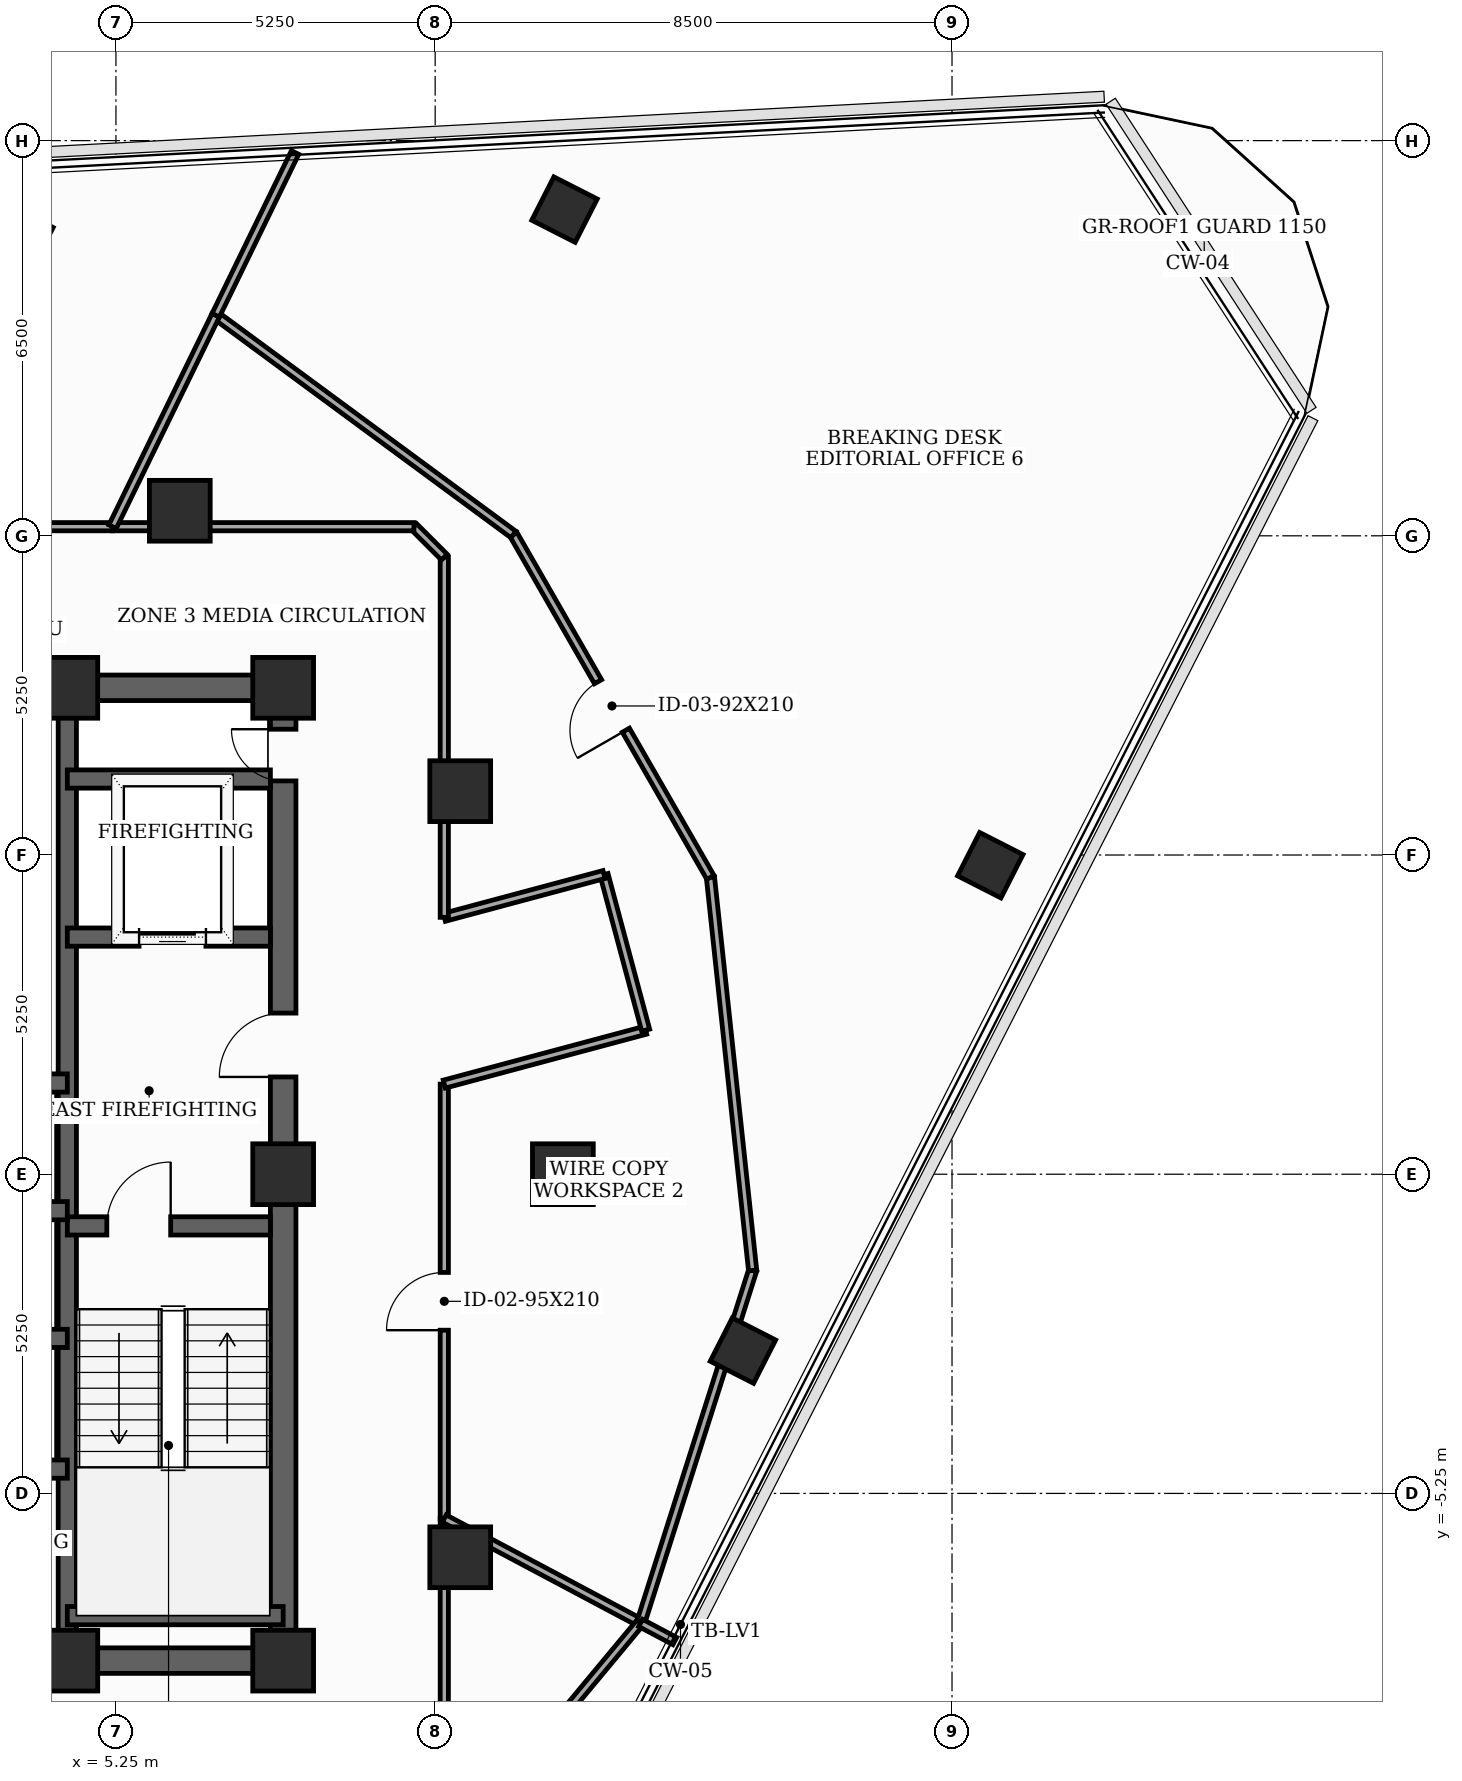
"""IFC4 building model, lengths in metres.
Left out: names, types, materials, properties, quantities, classifications, styles, units other than length and angle.
Written with IfcOpenShell. Run it as: python <this file> out.ifc"""

import sys

from ifc_helpers import new_model, si_unit, direction, frame, frame_2d, origin, origin_2d, place, context, subcontext, project, spatial, rectangle, extrude, element, fill, save


model = new_model("IFC4")
c1 = context("Model", 3, precision=1e-05, world=origin(), true_north=direction((0.0, 1.0)))
c2 = subcontext(c1, "Body", "Model", "MODEL_VIEW")
j1 = project(units=[si_unit("LENGTHUNIT", "METRE"), si_unit("PLANEANGLEUNIT", "RADIAN")], contexts=[c1])
p1 = place(None, origin())
s1 = spatial("IfcSite", under=j1, at=p1, CompositionType="ELEMENT")
p2 = place(p1, origin())
s2 = spatial("IfcBuilding", under=s1, at=p2, CompositionType="ELEMENT")
p3 = place(p2, frame((0.0, 0.0, 267.0)))
s3 = spatial("IfcBuildingStorey", under=s2, at=p3, CompositionType="ELEMENT", Elevation=267.0)
for number, where, z_axis, x_axis in (
    (1, (4.45, -8.0, 0.0), (0.0, 0.0, 1.0), (1.0, 0.0, 0.0)),
    (2, (8.0, -8.0, 0.0), (0.0, 0.0, 1.0), (1.0, 0.0, 0.0)),
    (3, (8.0, 0.0, 0.0), (0.0, 0.0, 1.0), (1.0, 0.0, 0.0)),
    (4, (8.0, 8.0, 0.0), (0.0, 0.0, 1.0), (1.0, 0.0, 0.0)),
    (5, (4.45, 8.0, 0.0), (0.0, 0.0, 1.0), (1.0, 0.0, 0.0)),
    (6, (12.6, 0.0, 0.0), (0.0, 0.0, 1.0), (1.0, 0.0, 0.0)),
    (7, (10.912, 6.3, 0.0), (0.0, 0.0, 1.0), (1.0, 0.0, 0.0)),
    (8, (6.3, 10.912, 0.0), (0.0, 0.0, 1.0), (1.0, 0.0, 0.0)),
    (9, (10.912, -6.3, 0.0), (0.0, 0.0, 1.0), (1.0, 0.0, 0.0)),
):
    element("IfcColumn", number, at=place(p3, frame(where, z_axis=z_axis, x_axis=x_axis)), inside=s3, PredefinedType="COLUMN", context=c2, shape_type="SweptSolid", body=[
        extrude(rectangle(XDim=1.0, YDim=1.0, at=origin_2d()), origin(), (0.0, 0.0, 1.0), 3.7),
    ])
for number, where, z_axis, x_axis in (
    (10, (15.562, -2.901, 0.0), (0.0, 0.0, 1.0), (0.454, 0.891, 0.0)),
    (11, (19.629, 5.082, 0.0), (0.0, 0.0, 1.0), (0.454, 0.891, 0.0)),
    (12, (12.627, 15.865, 0.0), (0.0, 0.0, 1.0), (0.454, 0.891, 0.0)),
    (13, (3.679, 15.396, 0.0), (0.0, 0.0, 1.0), (0.454, 0.891, 0.0)),
):
    element("IfcColumn", number, at=place(p3, frame(where, z_axis=z_axis, x_axis=x_axis)), inside=s3, PredefinedType="COLUMN", context=c2, shape_type="SweptSolid", body=[
        extrude(rectangle(XDim=0.8, YDim=0.8, at=origin_2d()), origin(), (0.0, 0.0, 1.0), 3.7),
    ])
p4 = place(p3, frame((8.0, -8.0, 0.0), z_axis=(0.0, 0.0, 1.0), x_axis=(0.0, 1.0, 0.0)))
e14 = element("IfcWall", 14, at=p4, inside=s3, PredefinedType="SHEAR", context=c2, shape_type="SweptSolid", body=[
    extrude(rectangle(XDim=16.0, YDim=0.42, at=frame_2d((8.0, 0.0))), origin(), (0.0, 0.0, 1.0), 3.5),
])
p5 = place(p4, frame((9.6, 0.0, 0.0)))
e15 = element("IfcOpeningElement", 15, at=p5, cuts=e14, PredefinedType="OPENING", context=c2, shape_type="SweptSolid", body=[
    extrude(rectangle(XDim=1.05, YDim=2.15, at=frame_2d((0.525, 1.075))), frame((0.0, 0.22, 0.0), z_axis=(0.0, -1.0, 0.0), x_axis=(1.0, 0.0, 0.0)), (0.0, 0.0, 1.0), 0.44),
])
p6 = place(p4, frame((14.469, 0.0, 0.0)))
e16 = element("IfcOpeningElement", 16, at=p6, cuts=e14, PredefinedType="OPENING", context=c2, shape_type="SweptSolid", body=[
    extrude(rectangle(XDim=0.85, YDim=2.02, at=frame_2d((0.425, 1.01))), frame((0.0, 0.22, 0.0), z_axis=(0.0, -1.0, 0.0), x_axis=(1.0, 0.0, 0.0)), (0.0, 0.0, 1.0), 0.44),
])
p7 = place(p3, frame((-8.0, -8.0, 0.0), z_axis=(0.0, 0.0, 1.0), x_axis=(1.0, 0.0, 0.0)))
e17 = element("IfcWall", 17, at=p7, inside=s3, PredefinedType="SHEAR", context=c2, shape_type="SweptSolid", body=[
    extrude(rectangle(XDim=16.0, YDim=0.42, at=frame_2d((8.0, 0.0))), origin(), (0.0, 0.0, 1.0), 3.5),
])
p8 = place(p7, frame((4.6, 0.0, 0.0)))
e18 = element("IfcOpeningElement", 18, at=p8, cuts=e17, PredefinedType="OPENING", context=c2, shape_type="SweptSolid", body=[
    extrude(rectangle(XDim=0.95, YDim=2.1, at=frame_2d((0.475, 1.05))), frame((0.0, 0.22, 0.0), z_axis=(0.0, -1.0, 0.0), x_axis=(1.0, 0.0, 0.0)), (0.0, 0.0, 1.0), 0.44),
])
p9 = place(p7, frame((7.52, 0.0, 0.0)))
e19 = element("IfcOpeningElement", 19, at=p9, cuts=e17, PredefinedType="OPENING", context=c2, shape_type="SweptSolid", body=[
    extrude(rectangle(XDim=0.95, YDim=2.1, at=frame_2d((0.475, 1.05))), frame((0.0, 0.22, 0.0), z_axis=(0.0, -1.0, 0.0), x_axis=(1.0, 0.0, 0.0)), (0.0, 0.0, 1.0), 0.44),
])
p10 = place(p7, frame((10.45, 0.0, 0.0)))
e20 = element("IfcOpeningElement", 20, at=p10, cuts=e17, PredefinedType="OPENING", context=c2, shape_type="SweptSolid", body=[
    extrude(rectangle(XDim=0.95, YDim=2.1, at=frame_2d((0.475, 1.05))), frame((0.0, 0.22, 0.0), z_axis=(0.0, -1.0, 0.0), x_axis=(1.0, 0.0, 0.0)), (0.0, 0.0, 1.0), 0.44),
])
p11 = place(p3, frame((-8.0, 8.0, 0.0), z_axis=(0.0, 0.0, 1.0), x_axis=(1.0, 0.0, 0.0)))
e21 = element("IfcWall", 21, at=p11, inside=s3, PredefinedType="SHEAR", context=c2, shape_type="SweptSolid", body=[
    extrude(rectangle(XDim=16.0, YDim=0.42, at=frame_2d((8.0, 0.0))), origin(), (0.0, 0.0, 1.0), 3.5),
])
p12 = place(p11, frame((7.1, 0.0, 0.0)))
e22 = element("IfcOpeningElement", 22, at=p12, cuts=e21, PredefinedType="OPENING", context=c2, shape_type="SweptSolid", body=[
    extrude(rectangle(XDim=1.8, YDim=2.15, at=frame_2d((0.9, 1.075))), frame((0.0, 0.22, 0.0), z_axis=(0.0, -1.0, 0.0), x_axis=(1.0, 0.0, 0.0)), (0.0, 0.0, 1.0), 0.44),
])
p13 = place(p3, frame((4.45, -7.79, 0.0), z_axis=(0.0, 0.0, 1.0), x_axis=(0.0, 1.0, 0.0)))
e23 = element("IfcWall", 23, at=p13, inside=s3, PredefinedType="SHEAR", context=c2, shape_type="SweptSolid", body=[
    extrude(rectangle(XDim=15.58, YDim=0.3, at=frame_2d((7.79, 0.0))), origin(), (0.0, 0.0, 1.0), 3.5),
])
p14 = place(p3, frame((4.45, -0.85, 0.0), z_axis=(0.0, 0.0, 1.0), x_axis=(1.0, 0.0, 0.0)))
e24 = element("IfcWall", 24, at=p14, inside=s3, PredefinedType="SHEAR", context=c2, shape_type="SweptSolid", body=[
    extrude(rectangle(XDim=3.34, YDim=0.3, at=frame_2d((1.67, 0.0))), origin(), (0.0, 0.0, 1.0), 3.5),
])
p15 = place(p14, frame((0.65, 0.0, 0.0)))
e25 = element("IfcOpeningElement", 25, at=p15, cuts=e24, PredefinedType="OPENING", context=c2, shape_type="SweptSolid", body=[
    extrude(rectangle(XDim=1.05, YDim=2.15, at=frame_2d((0.525, 1.075))), frame((0.0, 0.16, 0.0), z_axis=(0.0, -1.0, 0.0), x_axis=(1.0, 0.0, 0.0)), (0.0, 0.0, 1.0), 0.32),
])
p16 = place(p3, frame((4.45, -7.26, 0.0), z_axis=(0.0, 0.0, 1.0), x_axis=(1.0, 0.0, 0.0)))
e26 = element("IfcWall", 26, at=p16, inside=s3, PredefinedType="SHEAR", context=c2, shape_type="SweptSolid", body=[
    extrude(rectangle(XDim=3.55, YDim=0.3, at=frame_2d((1.775, 0.0))), origin(), (0.0, 0.0, 1.0), 3.5),
])
p17 = place(p3, frame((4.45, 3.9, 0.0), z_axis=(0.0, 0.0, 1.0), x_axis=(1.0, 0.0, 0.0)))
e27 = element("IfcWall", 27, at=p17, inside=s3, PredefinedType="SHEAR", context=c2, shape_type="SweptSolid", body=[
    extrude(rectangle(XDim=3.34, YDim=0.3, at=frame_2d((1.67, 0.0))), origin(), (0.0, 0.0, 1.0), 3.5),
])
p18 = place(p17, frame((1.18, 0.0, 0.0)))
e28 = element("IfcOpeningElement", 28, at=p18, cuts=e27, PredefinedType="OPENING", context=c2, shape_type="SweptSolid", body=[
    extrude(rectangle(XDim=1.1, YDim=2.1, at=frame_2d((0.55, 1.05))), frame((0.0, 0.16, 0.0), z_axis=(0.0, -1.0, 0.0), x_axis=(1.0, 0.0, 0.0)), (0.0, 0.0, 1.0), 0.32),
])
p19 = place(p3, frame((4.45, 6.5, 0.0), z_axis=(0.0, 0.0, 1.0), x_axis=(1.0, 0.0, 0.0)))
e29 = element("IfcWall", 29, at=p19, inside=s3, PredefinedType="SHEAR", context=c2, shape_type="SweptSolid", body=[
    extrude(rectangle(XDim=3.34, YDim=0.3, at=frame_2d((1.67, 0.0))), origin(), (0.0, 0.0, 1.0), 3.5),
])
p20 = place(p3, frame((-4.45, -4.85, 0.0), z_axis=(0.0, 0.0, 1.0), x_axis=(1.0, 0.0, 0.0)))
e30 = element("IfcWall", 30, at=p20, inside=s3, PredefinedType="SHEAR", context=c2, shape_type="SweptSolid", body=[
    extrude(rectangle(XDim=8.9, YDim=0.3, at=frame_2d((4.45, 0.0))), origin(), (0.0, 0.0, 1.0), 3.5),
])
for number, where, z_axis, x_axis in (
    (31, (1.68, 1.5, 0.0), (0.0, 0.0, 1.0), (1.0, 0.0, 0.0)),
    (32, (1.68, -2.7, 0.0), (0.0, 0.0, 1.0), (1.0, 0.0, 0.0)),
    (33, (1.68, -0.6, 0.0), (0.0, 0.0, 1.0), (1.0, 0.0, 0.0)),
):
    element("IfcWall", number, at=place(p3, frame(where, z_axis=z_axis, x_axis=x_axis)), inside=s3, PredefinedType="SHEAR", context=c2, shape_type="SweptSolid", body=[
        extrude(rectangle(XDim=2.77, YDim=0.3, at=frame_2d((1.385, 0.0))), origin(), (0.0, 0.0, 1.0), 3.5),
    ])
p21 = place(p3, frame((10.65, -5.663, 0.0), z_axis=(0.0, 0.0, 1.0), x_axis=(0.0, 1.0, 0.0)))
e34 = element("IfcWall", 34, at=p21, inside=s3, PredefinedType="PARTITIONING", context=c2, shape_type="SweptSolid", body=[
    extrude(rectangle(XDim=7.145, YDim=0.135, at=frame_2d((3.573, 0.0))), origin(), (0.0, 0.0, 1.0), 2.885),
])
p22 = place(p21, frame((3.097, 0.0, 0.0)))
e35 = element("IfcOpeningElement", 35, at=p22, cuts=e34, PredefinedType="OPENING", context=c2, shape_type="SweptSolid", body=[
    extrude(rectangle(XDim=0.95, YDim=2.1, at=frame_2d((0.475, 1.05))), frame((0.0, 0.077, 0.0), z_axis=(0.0, -1.0, 0.0), x_axis=(1.0, 0.0, 0.0)), (0.0, 0.0, 1.0), 0.155),
])
p23 = place(p3, frame((10.65, 1.482, 0.0), z_axis=(0.0, 0.0, 1.0), x_axis=(0.965961397105, 0.2586862565, 0.0)))
e36 = element("IfcWall", 36, at=p23, inside=s3, PredefinedType="PARTITIONING", context=c2, shape_type="SweptSolid", body=[
    extrude(rectangle(XDim=3.429, YDim=0.135, at=frame_2d((1.714, 0.0))), origin(), (0.0, 0.0, 1.0), 2.885),
])
p24 = place(p3, frame((13.962, 2.369, 0.0), z_axis=(0.0, 0.0, 1.0), x_axis=(-0.258413725385, 0.966034340245, 0.0)))
e37 = element("IfcWall", 37, at=p24, inside=s3, PredefinedType="PARTITIONING", context=c2, shape_type="SweptSolid", body=[
    extrude(rectangle(XDim=2.65, YDim=0.135, at=frame_2d((1.325, 0.0))), origin(), (0.0, 0.0, 1.0), 3.5),
])
p25 = place(p3, frame((13.277, 4.929, 0.0), z_axis=(0.0, 0.0, 1.0), x_axis=(-0.965934830229, -0.258785439601, 0.0)))
e38 = element("IfcWall", 38, at=p25, inside=s3, PredefinedType="PARTITIONING", context=c2, shape_type="SweptSolid", body=[
    extrude(rectangle(XDim=2.72, YDim=0.135, at=frame_2d((1.36, 0.0))), origin(), (0.0, 0.0, 1.0), 2.885),
])
p26 = place(p3, frame((10.65, 4.225, 0.0), z_axis=(0.0, 0.0, 1.0), x_axis=(0.0, 1.0, 0.0)))
e39 = element("IfcWall", 39, at=p26, inside=s3, PredefinedType="PARTITIONING", context=c2, shape_type="SweptSolid", body=[
    extrude(rectangle(XDim=5.925, YDim=0.135, at=frame_2d((2.962, 0.0))), origin(), (0.0, 0.0, 1.0), 2.885),
])
p27 = place(p3, frame((10.65, 10.15, 0.0), z_axis=(0.0, 0.0, 1.0), x_axis=(-0.707106781187, 0.707106781187, 0.0)))
e40 = element("IfcWall", 40, at=p27, inside=s3, PredefinedType="PARTITIONING", context=c2, shape_type="SweptSolid", body=[
    extrude(rectangle(XDim=0.707, YDim=0.135, at=frame_2d((0.354, 0.0))), origin(), (0.0, 0.0, 1.0), 3.5),
])
p28 = place(p3, frame((10.15, 10.65, 0.0), z_axis=(0.0, 0.0, 1.0), x_axis=(-1.0, 0.0, 0.0)))
e41 = element("IfcWall", 41, at=p28, inside=s3, PredefinedType="PARTITIONING", context=c2, shape_type="SweptSolid", body=[
    extrude(rectangle(XDim=4.956, YDim=0.135, at=frame_2d((2.478, 0.0))), origin(), (0.0, 0.0, 1.0), 2.085),
])
p29 = place(p3, frame((10.65, -10.15, 0.0), z_axis=(0.0, 0.0, 1.0), x_axis=(0.0, 1.0, 0.0)))
e42 = element("IfcWall", 42, at=p29, inside=s3, PredefinedType="PARTITIONING", context=c2, shape_type="SweptSolid", body=[
    extrude(rectangle(XDim=4.487, YDim=0.135, at=frame_2d((2.243, 0.0))), origin(), (0.0, 0.0, 1.0), 2.885),
])
p30 = place(p3, frame((5.194, 10.65, 0.0), z_axis=(0.0, 0.0, 1.0), x_axis=(-1.0, 0.0, 0.0)))
e43 = element("IfcWall", 43, at=p30, inside=s3, PredefinedType="PARTITIONING", context=c2, shape_type="SweptSolid", body=[
    extrude(rectangle(XDim=6.344, YDim=0.135, at=frame_2d((3.172, 0.0))), origin(), (0.0, 0.0, 1.0), 2.085),
])
p31 = place(p30, frame((2.697, 0.0, 0.0)))
e44 = element("IfcOpeningElement", 44, at=p31, cuts=e43, PredefinedType="OPENING", context=c2, shape_type="SweptSolid", body=[
    extrude(rectangle(XDim=0.95, YDim=2.035, at=frame_2d((0.475, 1.018))), frame((0.0, 0.077, 0.0), z_axis=(0.0, -1.0, 0.0), x_axis=(1.0, 0.0, 0.0)), (0.0, 0.0, 1.0), 0.155),
])
p32 = place(p3, frame((10.65, -5.663, 0.0), z_axis=(0.0, 0.0, 1.0), x_axis=(0.882982204984, -0.469406461057, 0.0)))
e45 = element("IfcWall", 45, at=p32, inside=s3, PredefinedType="PARTITIONING", context=c2, shape_type="SweptSolid", body=[
    extrude(rectangle(XDim=3.647, YDim=0.135, at=frame_2d((1.823, 0.0))), origin(), (0.0, 0.0, 1.0), 2.885),
])
p33 = place(p3, frame((13.887, -7.354, 0.0), z_axis=(0.0, 0.0, 1.0), x_axis=(0.302867480059, 0.953032680197, 0.0)))
e46 = element("IfcWall", 46, at=p33, inside=s3, PredefinedType="PARTITIONING", context=c2, shape_type="SweptSolid", body=[
    extrude(rectangle(XDim=6.055, YDim=0.135, at=frame_2d((3.028, 0.0))), origin(), (0.0, 0.0, 1.0), 3.035),
])
p34 = place(p3, frame((15.721, -1.583, 0.0), z_axis=(0.0, 0.0, 1.0), x_axis=(-0.106709447524, 0.994290246261, 0.0)))
e47 = element("IfcWall", 47, at=p34, inside=s3, PredefinedType="PARTITIONING", context=c2, shape_type="SweptSolid", body=[
    extrude(rectangle(XDim=6.502, YDim=0.135, at=frame_2d((3.251, 0.0))), origin(), (0.0, 0.0, 1.0), 3.035),
])
p35 = place(p3, frame((15.027, 4.882, 0.0), z_axis=(0.0, 0.0, 1.0), x_axis=(-0.498082419026, 0.867129692639, 0.0)))
e48 = element("IfcWall", 48, at=p35, inside=s3, PredefinedType="PARTITIONING", context=c2, shape_type="SweptSolid", body=[
    extrude(rectangle(XDim=6.503, YDim=0.135, at=frame_2d((3.251, 0.0))), origin(), (0.0, 0.0, 1.0), 3.185),
])
p36 = place(p35, frame((2.792, 0.0, 0.0)))
e49 = element("IfcOpeningElement", 49, at=p36, cuts=e48, PredefinedType="OPENING", context=c2, shape_type="SweptSolid", body=[
    extrude(rectangle(XDim=0.92, YDim=2.1, at=frame_2d((0.46, 1.05))), frame((0.0, 0.077, 0.0), z_axis=(0.0, -1.0, 0.0), x_axis=(1.0, 0.0, 0.0)), (0.0, 0.0, 1.0), 0.155),
])
p37 = place(p3, frame((11.788, 10.521, 0.0), z_axis=(0.0, 0.0, 1.0), x_axis=(-0.805162772786, 0.593053883993, 0.0)))
e50 = element("IfcWall", 50, at=p37, inside=s3, PredefinedType="PARTITIONING", context=c2, shape_type="SweptSolid", body=[
    extrude(rectangle(XDim=6.082, YDim=0.135, at=frame_2d((3.041, 0.0))), origin(), (0.0, 0.0, 1.0), 3.035),
])
p38 = place(p3, frame((6.891, 14.128, 0.0), z_axis=(0.0, 0.0, 1.0), x_axis=(-0.438511877771, -0.898725393573, 0.0)))
e51 = element("IfcWall", 51, at=p38, inside=s3, PredefinedType="PARTITIONING", context=c2, shape_type="SweptSolid", body=[
    extrude(rectangle(XDim=3.87, YDim=0.135, at=frame_2d((1.935, 0.0))), origin(), (0.0, 0.0, 1.0), 2.075),
])
p39 = place(p3, frame((13.87, -7.375, 0.0), z_axis=(0.0, 0.0, 1.0), x_axis=(-0.63949044568, -0.768799043888, 0.0)))
e52 = element("IfcWall", 52, at=p39, inside=s3, PredefinedType="PARTITIONING", context=c2, shape_type="SweptSolid", body=[
    extrude(rectangle(XDim=6.82, YDim=0.135, at=frame_2d((3.41, 0.0))), origin(), (0.0, 0.0, 1.0), 3.035),
])
p40 = place(p3, frame((14.441, -7.678, 0.0), z_axis=(0.0, 0.0, 1.0), x_axis=(-0.883423592085, 0.468575241501, 0.0)))
e53 = element("IfcWall", 53, at=p40, inside=s3, PredefinedType="PARTITIONING", context=c2, shape_type="SweptSolid", body=[
    extrude(rectangle(XDim=0.636, YDim=0.135, at=frame_2d((0.318, 0.0))), origin(), (0.0, 0.0, 1.0), 3.5),
])
p41 = place(p3, frame((8.196, 16.805, 0.0), z_axis=(0.0, 0.0, 1.0), x_axis=(-0.438139314435, -0.898907081486, 0.0)))
e54 = element("IfcWall", 54, at=p41, inside=s3, PredefinedType="PARTITIONING", context=c2, shape_type="SweptSolid", body=[
    extrude(rectangle(XDim=2.978, YDim=0.135, at=frame_2d((1.489, 0.0))), origin(), (0.0, 0.0, 1.0), 3.025),
])
p42 = place(p5, origin())
e55 = element("IfcDoor", 55, at=p42, inside=s3, OperationType="SINGLE_SWING_LEFT", PredefinedType="DOOR", context=c2, shape_type="SweptSolid", body=[
    extrude(rectangle(XDim=1.05, YDim=2.15, at=frame_2d((0.525, 1.075))), frame((0.0, 0.025, 0.0), z_axis=(0.0, -1.0, 0.0), x_axis=(1.0, 0.0, 0.0)), (0.0, 0.0, 1.0), 0.05),
])
fill(e15, e55)
p43 = place(p6, origin())
e56 = element("IfcDoor", 56, at=p43, inside=s3, OperationType="SINGLE_SWING_RIGHT", PredefinedType="TRAPDOOR", context=c2, shape_type="SweptSolid", body=[
    extrude(rectangle(XDim=0.85, YDim=2.02, at=frame_2d((0.425, 1.01))), frame((0.0, 0.025, 0.0), z_axis=(0.0, -1.0, 0.0), x_axis=(1.0, 0.0, 0.0)), (0.0, 0.0, 1.0), 0.05),
])
fill(e16, e56)
p44 = place(p15, origin())
e57 = element("IfcDoor", 57, at=p44, inside=s3, OperationType="SINGLE_SWING_RIGHT", PredefinedType="DOOR", context=c2, shape_type="SweptSolid", body=[
    extrude(rectangle(XDim=1.05, YDim=2.15, at=frame_2d((0.525, 1.075))), frame((0.0, 0.025, 0.0), z_axis=(0.0, -1.0, 0.0), x_axis=(1.0, 0.0, 0.0)), (0.0, 0.0, 1.0), 0.05),
])
fill(e25, e57)
p45 = place(p18, origin())
e58 = element("IfcDoor", 58, at=p45, inside=s3, OperationType="SLIDING_TO_LEFT", PredefinedType="DOOR", context=c2, shape_type="SweptSolid", body=[
    extrude(rectangle(XDim=1.1, YDim=2.1, at=frame_2d((0.55, 1.05))), frame((0.0, 0.025, 0.0), z_axis=(0.0, -1.0, 0.0), x_axis=(1.0, 0.0, 0.0)), (0.0, 0.0, 1.0), 0.05),
])
fill(e28, e58)
p46 = place(p22, origin())
e59 = element("IfcDoor", 59, at=p46, inside=s3, OperationType="SINGLE_SWING_LEFT", PredefinedType="DOOR", context=c2, shape_type="SweptSolid", body=[
    extrude(rectangle(XDim=0.95, YDim=2.1, at=frame_2d((0.475, 1.05))), frame((0.0, 0.025, 0.0), z_axis=(0.0, -1.0, 0.0), x_axis=(1.0, 0.0, 0.0)), (0.0, 0.0, 1.0), 0.05),
])
fill(e35, e59)
p47 = place(p36, origin())
e60 = element("IfcDoor", 60, at=p47, inside=s3, OperationType="SINGLE_SWING_LEFT", PredefinedType="DOOR", context=c2, shape_type="SweptSolid", body=[
    extrude(rectangle(XDim=0.92, YDim=2.1, at=frame_2d((0.46, 1.05))), frame((0.0, 0.025, 0.0), z_axis=(0.0, -1.0, 0.0), x_axis=(1.0, 0.0, 0.0)), (0.0, 0.0, 1.0), 0.05),
])
fill(e49, e60)
save(model, sys.argv[1])
